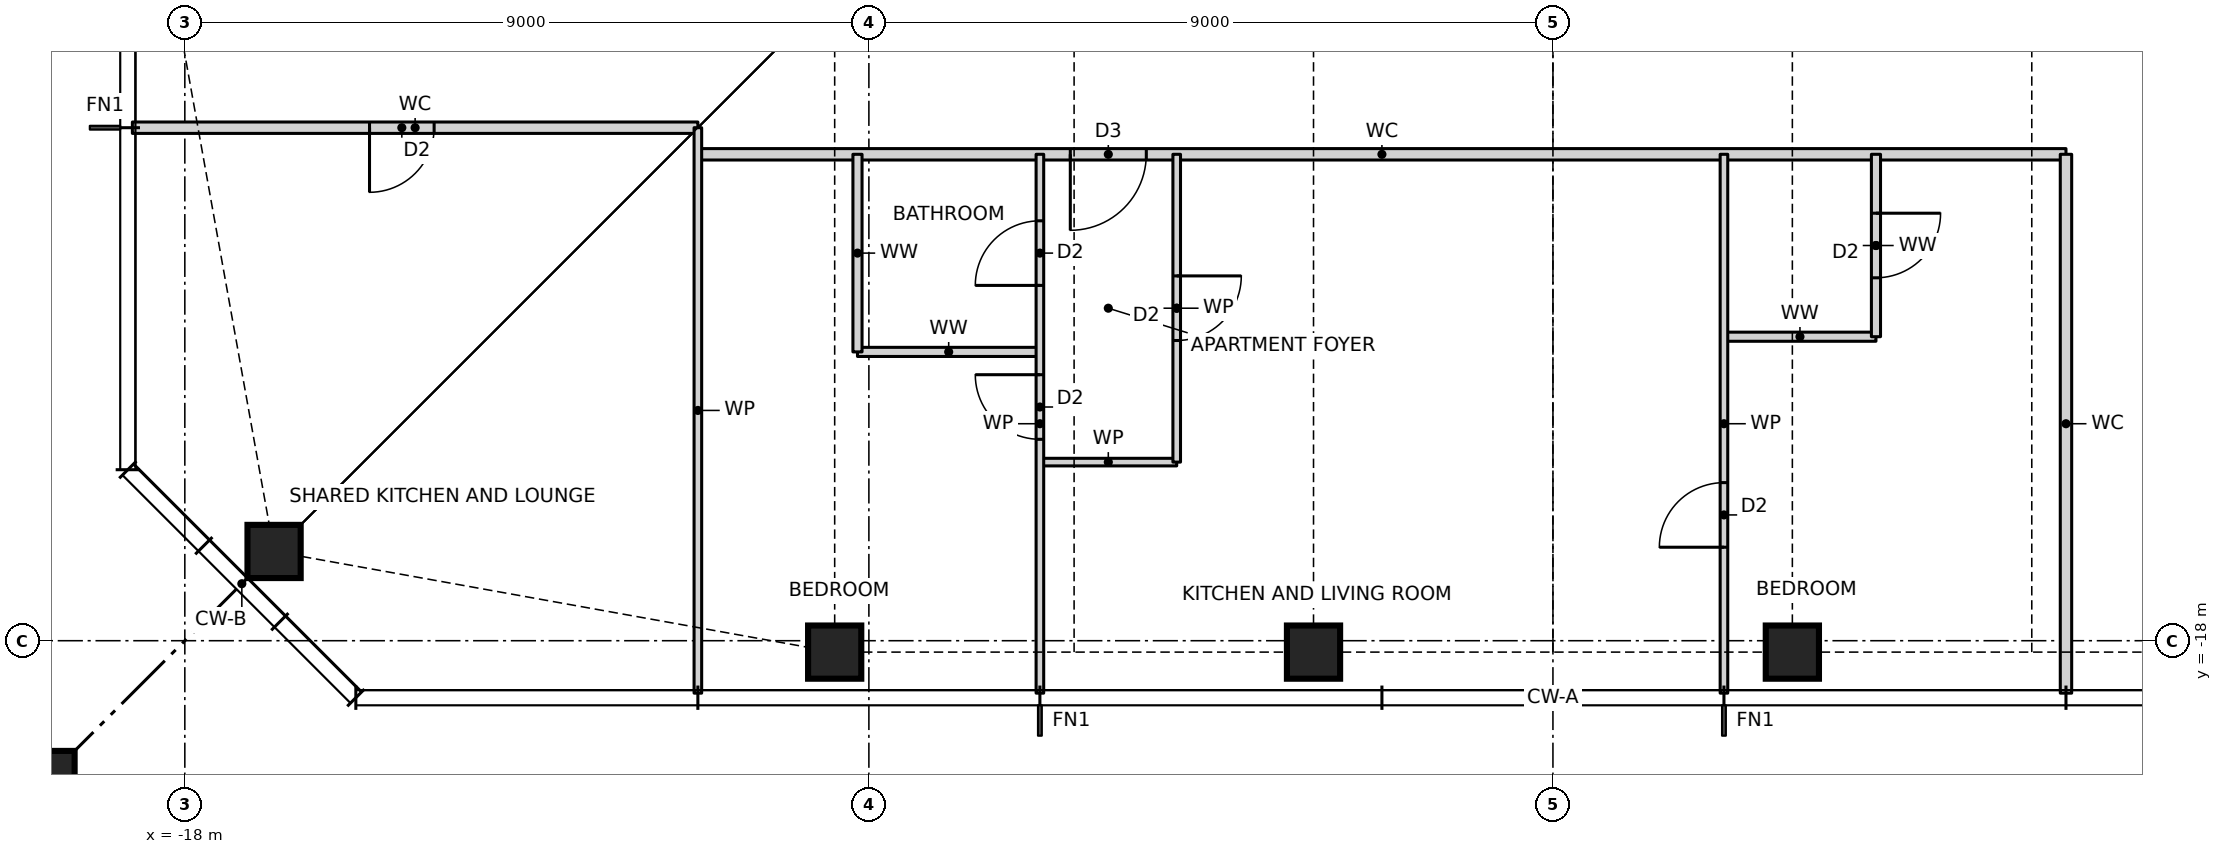
"""IFC4 building model, lengths in metres.
Left out: names, types, materials, properties, quantities, classifications, styles, units other than length and angle.
Written with IfcOpenShell. Run it as: python <this file> out.ifc"""

import sys

from ifc_helpers import new_model, si_unit, direction, frame, frame_2d, origin, origin_2d, place, context, subcontext, project, spatial, rectangle, hollow_rectangle, i_section, extrude, element, fill, save


model = new_model("IFC4")
c1 = context("Model", 3, precision=1e-05, world=origin(), true_north=direction((0.0, 1.0)))
c2 = subcontext(c1, "Body", "Model", "MODEL_VIEW")
j1 = project(units=[si_unit("LENGTHUNIT", "METRE"), si_unit("PLANEANGLEUNIT", "RADIAN")], contexts=[c1])
p1 = place(None, origin())
s1 = spatial("IfcSite", under=j1, at=p1, CompositionType="ELEMENT")
p2 = place(p1, origin())
s2 = spatial("IfcBuilding", under=s1, at=p2, CompositionType="ELEMENT")
p3 = place(p2, frame((0.0, 0.0, 174.0)))
s3 = spatial("IfcBuildingStorey", under=s2, at=p3, CompositionType="ELEMENT", Elevation=174.0)
for number, where, z_axis, x_axis in (
    (1, (-16.826, -16.826, 0.0), (0.0, 0.0, 1.0), (1.0, 0.0, 0.0)),
    (2, (-9.45, -18.15, 0.0), (0.0, 0.0, 1.0), (1.0, 0.0, 0.0)),
    (3, (-3.15, -18.15, 0.0), (0.0, 0.0, 1.0), (1.0, 0.0, 0.0)),
    (4, (3.15, -18.15, 0.0), (0.0, 0.0, 1.0), (1.0, 0.0, 0.0)),
):
    element("IfcColumn", number, at=place(p3, frame(where, z_axis=z_axis, x_axis=x_axis)), inside=s3, PredefinedType="COLUMN", context=c2, shape_type="SweptSolid", body=[
        extrude(hollow_rectangle(XDim=0.7, YDim=0.7, WallThickness=0.06, at=origin_2d()), origin(), (0.0, 0.0, 1.0), 3.5),
    ])
p4 = place(p3, frame((-21.65, -21.65, 0.0), z_axis=(0.0, 0.0, 1.0), x_axis=(1.0, 0.0, 0.0)))
e5 = element("IfcColumn", 5, at=p4, inside=s3, PredefinedType="COLUMN", context=c2, shape_type="SweptSolid", body=[
    extrude(rectangle(XDim=4.4, YDim=4.4, at=origin_2d()), origin(), (0.0, 0.0, 1.0), 3.5),
    extrude(i_section(OverallWidth=0.478, OverallDepth=0.599, WebThickness=0.1, FlangeThickness=0.14, at=origin_2d()), origin(), (0.0, 0.0, 1.0), 3.5),
])
p5 = place(p3, frame((-6.75, -15.65, 0.0), z_axis=(0.0, 0.0, 1.0), x_axis=(1.0, 0.0, 0.0)))
e6 = element("IfcWall", 6, at=p5, inside=s3, PredefinedType="PARTITIONING", context=c2, shape_type="SweptSolid", body=[
    extrude(rectangle(XDim=1.8, YDim=0.1, at=frame_2d((0.9, 0.0))), origin(), (0.0, 0.0, 1.0), 3.27),
])
p6 = place(p3, frame((-9.15, -14.2, 0.0), z_axis=(0.0, 0.0, 1.0), x_axis=(1.0, 0.0, 0.0)))
e7 = element("IfcWall", 7, at=p6, inside=s3, PredefinedType="PARTITIONING", context=c2, shape_type="SweptSolid", body=[
    extrude(rectangle(XDim=2.4, YDim=0.12, at=frame_2d((1.2, 0.0))), origin(), (0.0, 0.0, 1.0), 3.27),
])
p7 = place(p3, frame((2.25, -14.0, 0.0), z_axis=(0.0, 0.0, 1.0), x_axis=(1.0, 0.0, 0.0)))
e8 = element("IfcWall", 8, at=p7, inside=s3, PredefinedType="PARTITIONING", context=c2, shape_type="SweptSolid", body=[
    extrude(rectangle(XDim=2.0, YDim=0.12, at=frame_2d((1.0, 0.0))), origin(), (0.0, 0.0, 1.0), 3.27),
])
p8 = place(p3, frame((-11.25, -11.6, 0.0), z_axis=(0.0, 0.0, 1.0), x_axis=(1.0, 0.0, 0.0)))
e9 = element("IfcWall", 9, at=p8, inside=s3, PredefinedType="PARTITIONING", context=c2, shape_type="SweptSolid", body=[
    extrude(rectangle(XDim=18.0, YDim=0.15, at=frame_2d((9.0, 0.0))), origin(), (0.0, 0.0, 1.0), 3.27),
])
p9 = place(p8, frame((4.9, 0.0, 0.0)))
e10 = element("IfcOpeningElement", 10, at=p9, cuts=e9, PredefinedType="OPENING", context=c2, shape_type="SweptSolid", body=[
    extrude(rectangle(XDim=1.0, YDim=2.1, at=frame_2d((0.5, 1.05))), frame((0.0, 0.085, 0.0), z_axis=(0.0, -1.0, 0.0), x_axis=(1.0, 0.0, 0.0)), (0.0, 0.0, 1.0), 0.17),
])
p10 = place(p3, frame((-18.69, -11.25, 0.0), z_axis=(0.0, 0.0, 1.0), x_axis=(1.0, 0.0, 0.0)))
e11 = element("IfcWall", 11, at=p10, inside=s3, PredefinedType="PARTITIONING", context=c2, shape_type="SweptSolid", body=[
    extrude(rectangle(XDim=7.44, YDim=0.15, at=frame_2d((3.72, 0.0))), origin(), (0.0, 0.0, 1.0), 3.27),
])
p11 = place(p10, frame((3.12, 0.0, 0.0)))
e12 = element("IfcOpeningElement", 12, at=p11, cuts=e11, PredefinedType="OPENING", context=c2, shape_type="SweptSolid", body=[
    extrude(rectangle(XDim=0.85, YDim=2.1, at=frame_2d((0.425, 1.05))), frame((0.0, 0.085, 0.0), z_axis=(0.0, -1.0, 0.0), x_axis=(1.0, 0.0, 0.0)), (0.0, 0.0, 1.0), 0.17),
])
p12 = place(p3, frame((6.75, -18.69, 0.0), z_axis=(0.0, 0.0, 1.0), x_axis=(0.0, 1.0, 0.0)))
e13 = element("IfcWall", 13, at=p12, inside=s3, PredefinedType="PARTITIONING", context=c2, shape_type="SweptSolid", body=[
    extrude(rectangle(XDim=7.09, YDim=0.15, at=frame_2d((3.545, 0.0))), origin(), (0.0, 0.0, 1.0), 3.27),
])
p13 = place(p3, frame((4.25, -14.0, 0.0), z_axis=(0.0, 0.0, 1.0), x_axis=(0.0, 1.0, 0.0)))
e14 = element("IfcWall", 14, at=p13, inside=s3, PredefinedType="PARTITIONING", context=c2, shape_type="SweptSolid", body=[
    extrude(rectangle(XDim=2.4, YDim=0.12, at=frame_2d((1.2, 0.0))), origin(), (0.0, 0.0, 1.0), 3.27),
])
p14 = place(p13, frame((0.775, 0.0, 0.0)))
e15 = element("IfcOpeningElement", 15, at=p14, cuts=e14, PredefinedType="OPENING", context=c2, shape_type="SweptSolid", body=[
    extrude(rectangle(XDim=0.85, YDim=2.1, at=frame_2d((0.425, 1.05))), frame((0.0, 0.07, 0.0), z_axis=(0.0, -1.0, 0.0), x_axis=(1.0, 0.0, 0.0)), (0.0, 0.0, 1.0), 0.14),
])
p15 = place(p3, frame((2.25, -18.69, 0.0), z_axis=(0.0, 0.0, 1.0), x_axis=(0.0, 1.0, 0.0)))
e16 = element("IfcWall", 16, at=p15, inside=s3, PredefinedType="PARTITIONING", context=c2, shape_type="SweptSolid", body=[
    extrude(rectangle(XDim=7.09, YDim=0.1, at=frame_2d((3.545, 0.0))), origin(), (0.0, 0.0, 1.0), 3.27),
])
p16 = place(p15, frame((1.92, 0.0, 0.0)))
e17 = element("IfcOpeningElement", 17, at=p16, cuts=e16, PredefinedType="OPENING", context=c2, shape_type="SweptSolid", body=[
    extrude(rectangle(XDim=0.85, YDim=2.1, at=frame_2d((0.425, 1.05))), frame((0.0, 0.06, 0.0), z_axis=(0.0, -1.0, 0.0), x_axis=(1.0, 0.0, 0.0)), (0.0, 0.0, 1.0), 0.12),
])
p17 = place(p3, frame((-4.95, -15.65, 0.0), z_axis=(0.0, 0.0, 1.0), x_axis=(0.0, 1.0, 0.0)))
e18 = element("IfcWall", 18, at=p17, inside=s3, PredefinedType="PARTITIONING", context=c2, shape_type="SweptSolid", body=[
    extrude(rectangle(XDim=4.05, YDim=0.1, at=frame_2d((2.025, 0.0))), origin(), (0.0, 0.0, 1.0), 3.27),
])
p18 = place(p17, frame((1.6, 0.0, 0.0)))
e19 = element("IfcOpeningElement", 19, at=p18, cuts=e18, PredefinedType="OPENING", context=c2, shape_type="SweptSolid", body=[
    extrude(rectangle(XDim=0.85, YDim=2.1, at=frame_2d((0.425, 1.05))), frame((0.0, 0.06, 0.0), z_axis=(0.0, -1.0, 0.0), x_axis=(1.0, 0.0, 0.0)), (0.0, 0.0, 1.0), 0.12),
])
p19 = place(p3, frame((-6.75, -18.69, 0.0), z_axis=(0.0, 0.0, 1.0), x_axis=(0.0, 1.0, 0.0)))
e20 = element("IfcWall", 20, at=p19, inside=s3, PredefinedType="PARTITIONING", context=c2, shape_type="SweptSolid", body=[
    extrude(rectangle(XDim=7.09, YDim=0.1, at=frame_2d((3.545, 0.0))), origin(), (0.0, 0.0, 1.0), 3.27),
])
p20 = place(p19, frame((3.34, 0.0, 0.0)))
e21 = element("IfcOpeningElement", 21, at=p20, cuts=e20, PredefinedType="OPENING", context=c2, shape_type="SweptSolid", body=[
    extrude(rectangle(XDim=0.85, YDim=2.1, at=frame_2d((0.425, 1.05))), frame((0.0, 0.06, 0.0), z_axis=(0.0, -1.0, 0.0), x_axis=(1.0, 0.0, 0.0)), (0.0, 0.0, 1.0), 0.12),
])
p21 = place(p19, frame((5.365, 0.0, 0.0)))
e22 = element("IfcOpeningElement", 22, at=p21, cuts=e20, PredefinedType="OPENING", context=c2, shape_type="SweptSolid", body=[
    extrude(rectangle(XDim=0.85, YDim=2.1, at=frame_2d((0.425, 1.05))), frame((0.0, 0.06, 0.0), z_axis=(0.0, -1.0, 0.0), x_axis=(1.0, 0.0, 0.0)), (0.0, 0.0, 1.0), 0.12),
])
p22 = place(p3, frame((-9.15, -14.2, 0.0), z_axis=(0.0, 0.0, 1.0), x_axis=(0.0, 1.0, 0.0)))
e23 = element("IfcWall", 23, at=p22, inside=s3, PredefinedType="PARTITIONING", context=c2, shape_type="SweptSolid", body=[
    extrude(rectangle(XDim=2.6, YDim=0.12, at=frame_2d((1.3, 0.0))), origin(), (0.0, 0.0, 1.0), 3.27),
])
p23 = place(p3, frame((-11.25, -18.69, 0.0), z_axis=(0.0, 0.0, 1.0), x_axis=(0.0, 1.0, 0.0)))
e24 = element("IfcWall", 24, at=p23, inside=s3, PredefinedType="PARTITIONING", context=c2, shape_type="SweptSolid", body=[
    extrude(rectangle(XDim=7.44, YDim=0.1, at=frame_2d((3.72, 0.0))), origin(), (0.0, 0.0, 1.0), 3.27),
])
p24 = place(p9, frame((1.0, 0.0, 0.0), z_axis=(0.0, 0.0, 1.0), x_axis=(-1.0, 0.0, 0.0)))
e25 = element("IfcDoor", 25, at=p24, inside=s3, OperationType="SINGLE_SWING_RIGHT", PredefinedType="DOOR", context=c2, shape_type="SweptSolid", body=[
    extrude(rectangle(XDim=1.0, YDim=2.1, at=frame_2d((0.5, 1.05))), frame((0.0, 0.025, 0.0), z_axis=(0.0, -1.0, 0.0), x_axis=(1.0, 0.0, 0.0)), (0.0, 0.0, 1.0), 0.05),
])
fill(e10, e25)
p25 = place(p18, frame((0.85, 0.0, 0.0), z_axis=(0.0, 0.0, 1.0), x_axis=(-1.0, 0.0, 0.0)))
e26 = element("IfcDoor", 26, at=p25, inside=s3, OperationType="SINGLE_SWING_LEFT", PredefinedType="DOOR", context=c2, shape_type="SweptSolid", body=[
    extrude(rectangle(XDim=0.85, YDim=2.1, at=frame_2d((0.425, 1.05))), frame((0.0, 0.025, 0.0), z_axis=(0.0, -1.0, 0.0), x_axis=(1.0, 0.0, 0.0)), (0.0, 0.0, 1.0), 0.05),
])
fill(e19, e26)
p26 = place(p20, origin())
e27 = element("IfcDoor", 27, at=p26, inside=s3, OperationType="SINGLE_SWING_RIGHT", PredefinedType="DOOR", context=c2, shape_type="SweptSolid", body=[
    extrude(rectangle(XDim=0.85, YDim=2.1, at=frame_2d((0.425, 1.05))), frame((0.0, 0.025, 0.0), z_axis=(0.0, -1.0, 0.0), x_axis=(1.0, 0.0, 0.0)), (0.0, 0.0, 1.0), 0.05),
])
fill(e21, e27)
p27 = place(p21, origin())
e28 = element("IfcDoor", 28, at=p27, inside=s3, OperationType="SINGLE_SWING_LEFT", PredefinedType="DOOR", context=c2, shape_type="SweptSolid", body=[
    extrude(rectangle(XDim=0.85, YDim=2.1, at=frame_2d((0.425, 1.05))), frame((0.0, 0.025, 0.0), z_axis=(0.0, -1.0, 0.0), x_axis=(1.0, 0.0, 0.0)), (0.0, 0.0, 1.0), 0.05),
])
fill(e22, e28)
p28 = place(p16, origin())
e29 = element("IfcDoor", 29, at=p28, inside=s3, OperationType="SINGLE_SWING_LEFT", PredefinedType="DOOR", context=c2, shape_type="SweptSolid", body=[
    extrude(rectangle(XDim=0.85, YDim=2.1, at=frame_2d((0.425, 1.05))), frame((0.0, 0.025, 0.0), z_axis=(0.0, -1.0, 0.0), x_axis=(1.0, 0.0, 0.0)), (0.0, 0.0, 1.0), 0.05),
])
fill(e17, e29)
p29 = place(p14, frame((0.85, 0.0, 0.0), z_axis=(0.0, 0.0, 1.0), x_axis=(-1.0, 0.0, 0.0)))
e30 = element("IfcDoor", 30, at=p29, inside=s3, OperationType="SINGLE_SWING_LEFT", PredefinedType="DOOR", context=c2, shape_type="SweptSolid", body=[
    extrude(rectangle(XDim=0.85, YDim=2.1, at=frame_2d((0.425, 1.05))), frame((0.0, 0.025, 0.0), z_axis=(0.0, -1.0, 0.0), x_axis=(1.0, 0.0, 0.0)), (0.0, 0.0, 1.0), 0.05),
])
fill(e15, e30)
p30 = place(p11, frame((0.85, 0.0, 0.0), z_axis=(0.0, 0.0, 1.0), x_axis=(-1.0, 0.0, 0.0)))
e31 = element("IfcDoor", 31, at=p30, inside=s3, OperationType="SINGLE_SWING_RIGHT", PredefinedType="DOOR", context=c2, shape_type="SweptSolid", body=[
    extrude(rectangle(XDim=0.85, YDim=2.1, at=frame_2d((0.425, 1.05))), frame((0.0, 0.025, 0.0), z_axis=(0.0, -1.0, 0.0), x_axis=(1.0, 0.0, 0.0)), (0.0, 0.0, 1.0), 0.05),
])
fill(e12, e31)
save(model, sys.argv[1])
